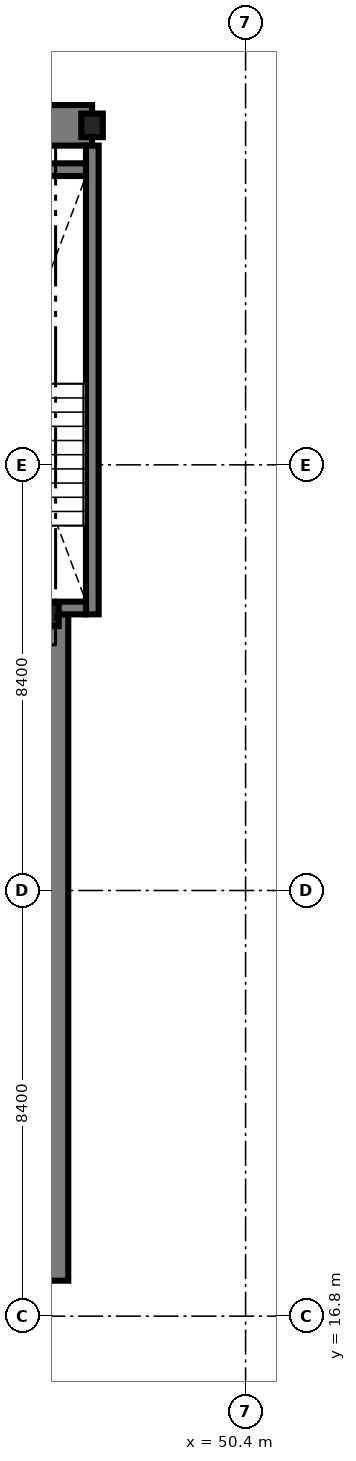
"""IFC4 building model, lengths in metres.
Left out: names, types, materials, properties, quantities, classifications, styles, units other than length and angle.
Written with IfcOpenShell. Run it as: python <this file> out.ifc"""

import sys

from ifc_helpers import new_model, si_unit, direction, frame, frame_2d, origin, origin_2d, place, context, subcontext, project, spatial, rectangle, i_section, extrude, source, transform, mapped, element, save


model = new_model("IFC4")
c1 = context("Model", 3, precision=1e-05, world=origin(), true_north=direction((0.0, 1.0)))
c2 = subcontext(c1, "Body", "Model", "MODEL_VIEW")
j1 = project(units=[si_unit("LENGTHUNIT", "METRE"), si_unit("PLANEANGLEUNIT", "RADIAN")], contexts=[c1])
p1 = place(None, origin())
s1 = spatial("IfcSite", under=j1, at=p1, CompositionType="ELEMENT")
p2 = place(p1, origin())
s2 = spatial("IfcBuilding", under=s1, at=p2, CompositionType="ELEMENT")
p3 = place(p2, frame((0.0, 0.0, 118.7)))
s3 = spatial("IfcBuildingStorey", under=s2, at=p3, CompositionType="ELEMENT", Elevation=118.7)
m1 = source(origin(), c2, "Body", "SweptSolid", [
    extrude(rectangle(XDim=17.52, YDim=0.8, at=frame_2d((8.76, 0.0))), origin(), (0.0, 0.0, 1.0), 3.46),
])
p4 = place(p3, frame((29.85, 40.3, 0.0), z_axis=(0.0, 0.0, 1.0), x_axis=(1.0, 0.0, 0.0)))
e1 = element("IfcWall", 1, at=p4, inside=s3, PredefinedType="SHEAR", context=c2, shape_type="MappedRepresentation", body=[
    mapped(m1, transform((0.0, 0.0, 0.0), scale=1.0)),
])
m2 = source(origin(), c2, "Body", "SweptSolid", [
    extrude(rectangle(XDim=13.15, YDim=0.8, at=frame_2d((6.575, 0.0))), origin(), (0.0, 0.0, 1.0), 3.46),
])
p5 = place(p3, frame((46.5, 17.5, 0.0), z_axis=(0.0, 0.0, 1.0), x_axis=(0.0, 1.0, 0.0)))
e2 = element("IfcWall", 2, at=p5, inside=s3, PredefinedType="SHEAR", context=c2, shape_type="MappedRepresentation", body=[
    mapped(m2, transform((0.0, 0.0, 0.0), scale=1.0)),
])
m3 = source(origin(), c2, "Body", "SweptSolid", [
    extrude(i_section(OverallWidth=0.424, OverallDepth=0.465, WebThickness=0.035, FlangeThickness=0.056, FilletRadius=0.015, at=origin_2d()), origin(), (0.0, 0.0, 1.0), 3.46),
])
for number, where, z_axis, x_axis in (
    (3, (46.5, 30.65, 0.0), (0.0, 0.0, 1.0), (1.0, 0.0, 0.0)),
    (4, (47.37, 40.3, 0.0), (0.0, 0.0, 1.0), (1.0, 0.0, 0.0)),
):
    element("IfcColumn", number, at=place(p3, frame(where, z_axis=z_axis, x_axis=x_axis)), inside=s3, PredefinedType="COLUMN", context=c2, shape_type="MappedRepresentation", body=[
        mapped(m3, transform((0.0, 0.0, 0.0), scale=1.0)),
    ])
m4 = source(origin(), c2, "Body", "SweptSolid", [
    extrude(rectangle(XDim=9.25, YDim=0.25, at=frame_2d((4.625, 0.0))), origin(), (0.0, 0.0, 1.0), 3.5),
])
p6 = place(p3, frame((47.375, 30.65, 0.0), z_axis=(0.0, 0.0, 1.0), x_axis=(0.0, 1.0, 0.0)))
e5 = element("IfcWall", 5, at=p6, inside=s3, PredefinedType="SOLIDWALL", context=c2, shape_type="MappedRepresentation", body=[
    mapped(m4, transform((0.0, 0.0, 0.0), scale=1.0)),
])
m5 = source(origin(), c2, "Body", "SweptSolid", [
    extrude(rectangle(XDim=3.15, YDim=0.25, at=frame_2d((1.575, 0.0))), origin(), (0.0, 0.0, 1.0), 3.5),
])
p7 = place(p3, frame((44.1, 39.425, 0.0), z_axis=(0.0, 0.0, 1.0), x_axis=(1.0, 0.0, 0.0)))
e6 = element("IfcWall", 6, at=p7, inside=s3, PredefinedType="SOLIDWALL", context=c2, shape_type="MappedRepresentation", body=[
    mapped(m5, transform((0.0, 0.0, 0.0), scale=1.0)),
])
p8 = place(p3, frame((44.1, 30.775, 0.0), z_axis=(0.0, 0.0, 1.0), x_axis=(1.0, 0.0, 0.0)))
e7 = element("IfcWall", 7, at=p8, inside=s3, PredefinedType="SOLIDWALL", context=c2, shape_type="MappedRepresentation", body=[
    mapped(m5, transform((0.0, 0.0, 0.0), scale=1.0)),
])
m6 = source(origin(), c2, "Body", "SweptSolid", [
    extrude(rectangle(XDim=1.1, YDim=2.2, at=frame_2d((0.55, 1.1))), frame((0.0, 0.135, 0.0), z_axis=(0.0, -1.0, 0.0), x_axis=(1.0, 0.0, 0.0)), (0.0, 0.0, 1.0), 0.27),
])
p9 = place(p8, frame((0.35, 0.0, 0.0)))
e8 = element("IfcOpeningElement", 8, at=p9, cuts=e7, PredefinedType="OPENING", context=c2, shape_type="MappedRepresentation", body=[
    mapped(m6, transform((0.0, 0.0, 0.0), scale=1.0)),
])
save(model, sys.argv[1])
